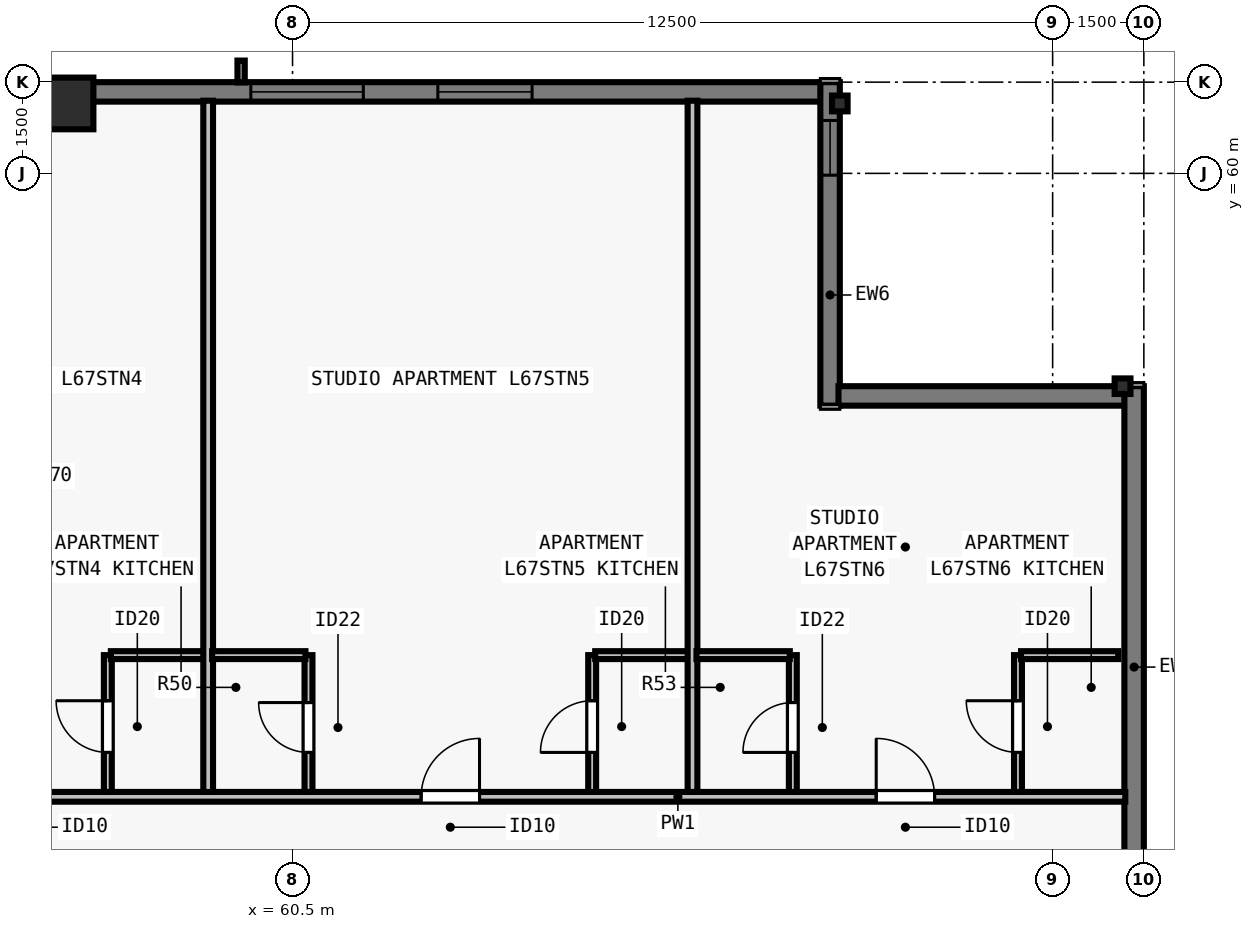
"""IFC4 building model, lengths in metres.
Left out: names, types, materials, properties, quantities, classifications, styles, units other than length and angle.
Written with IfcOpenShell. Run it as: python <this file> out.ifc"""

import sys

from ifc_helpers import new_model, si_unit, direction, frame, frame_2d, origin, origin_2d, place, context, subcontext, project, spatial, rectangle, i_section, extrude, element, fill, save


model = new_model("IFC4")
c1 = context("Model", 3, precision=1e-05, world=origin(), true_north=direction((0.0, 1.0)))
c2 = subcontext(c1, "Body", "Model", "MODEL_VIEW")
j1 = project(units=[si_unit("LENGTHUNIT", "METRE"), si_unit("PLANEANGLEUNIT", "RADIAN")], contexts=[c1])
p1 = place(None, origin())
s1 = spatial("IfcSite", under=j1, at=p1, CompositionType="ELEMENT")
p2 = place(p1, origin())
s2 = spatial("IfcBuilding", under=s1, at=p2, CompositionType="ELEMENT")
p3 = place(p2, frame((0.0, 0.0, 244.5)))
s3 = spatial("IfcBuildingStorey", under=s2, at=p3, CompositionType="ELEMENT", Elevation=244.5)
for number, where, z_axis, x_axis in (
    (1, (74.15, 56.5, 0.0), (0.0, 0.0, 1.0), (0.0, 1.0, 0.0)),
    (2, (69.5, 61.15, 0.0), (0.0, 0.0, 1.0), (1.0, 0.0, 0.0)),
):
    element("IfcColumn", number, at=place(p3, frame(where, z_axis=z_axis, x_axis=x_axis)), inside=s3, PredefinedType="COLUMN", context=c2, shape_type="SweptSolid", body=[
        extrude(i_section(OverallWidth=0.256, OverallDepth=0.26, WebThickness=0.01, FlangeThickness=0.017, FilletRadius=0.013, at=origin_2d()), origin(), (0.0, 0.0, 1.0), 3.5),
    ])
p4 = place(p3, frame((56.8, 61.15, 0.0), z_axis=(0.0, 0.0, 1.0), x_axis=(1.0, 0.0, 0.0)))
e3 = element("IfcColumn", 3, at=p4, inside=s3, PredefinedType="COLUMN", context=c2, shape_type="SweptSolid", body=[
    extrude(rectangle(XDim=0.85, YDim=0.85, at=origin_2d()), origin(), (0.0, 0.0, 1.0), 3.5),
])
p5 = place(p3, frame((34.5, 61.34, 0.0), z_axis=(0.0, 0.0, 1.0), x_axis=(1.0, 0.0, 0.0)))
e4 = element("IfcWall", 4, at=p5, inside=s3, PredefinedType="SOLIDWALL", context=c2, shape_type="SweptSolid", body=[
    extrude(rectangle(XDim=34.702, YDim=0.32, at=frame_2d((17.351, 0.0))), origin(), (0.0, 0.0, 1.0), 3.29),
])
p6 = place(p5, frame((4.613, 0.0, 0.8)))
e5 = element("IfcOpeningElement", 5, at=p6, cuts=e4, PredefinedType="OPENING", context=c2, shape_type="SweptSolid", body=[
    extrude(rectangle(XDim=1.85, YDim=1.678, at=frame_2d((0.925, 0.839))), frame((0.0, 0.17, 0.0), z_axis=(0.0, -1.0, 0.0), x_axis=(1.0, 0.0, 0.0)), (0.0, 0.0, 1.0), 0.34),
])
p7 = place(p5, frame((7.688, 0.0, 0.8)))
e6 = element("IfcOpeningElement", 6, at=p7, cuts=e4, PredefinedType="OPENING", context=c2, shape_type="SweptSolid", body=[
    extrude(rectangle(XDim=1.55, YDim=1.678, at=frame_2d((0.775, 0.839))), frame((0.0, 0.17, 0.0), z_axis=(0.0, -1.0, 0.0), x_axis=(1.0, 0.0, 0.0)), (0.0, 0.0, 1.0), 0.34),
])
p8 = place(p5, frame((14.888, 0.0, 0.8)))
e7 = element("IfcOpeningElement", 7, at=p8, cuts=e4, PredefinedType="OPENING", context=c2, shape_type="SweptSolid", body=[
    extrude(rectangle(XDim=1.55, YDim=1.678, at=frame_2d((0.775, 0.839))), frame((0.0, 0.17, 0.0), z_axis=(0.0, -1.0, 0.0), x_axis=(1.0, 0.0, 0.0)), (0.0, 0.0, 1.0), 0.34),
])
p9 = place(p5, frame((18.564, 0.0, 0.8)))
e8 = element("IfcOpeningElement", 8, at=p9, cuts=e4, PredefinedType="OPENING", context=c2, shape_type="SweptSolid", body=[
    extrude(rectangle(XDim=1.85, YDim=1.678, at=frame_2d((0.925, 0.839))), frame((0.0, 0.17, 0.0), z_axis=(0.0, -1.0, 0.0), x_axis=(1.0, 0.0, 0.0)), (0.0, 0.0, 1.0), 0.34),
])
p10 = place(p5, frame((25.314, 0.0, 0.8)))
e9 = element("IfcOpeningElement", 9, at=p10, cuts=e4, PredefinedType="OPENING", context=c2, shape_type="SweptSolid", body=[
    extrude(rectangle(XDim=1.85, YDim=1.678, at=frame_2d((0.925, 0.839))), frame((0.0, 0.17, 0.0), z_axis=(0.0, -1.0, 0.0), x_axis=(1.0, 0.0, 0.0)), (0.0, 0.0, 1.0), 0.34),
])
p11 = place(p5, frame((28.389, 0.0, 0.8)))
e10 = element("IfcOpeningElement", 10, at=p11, cuts=e4, PredefinedType="OPENING", context=c2, shape_type="SweptSolid", body=[
    extrude(rectangle(XDim=1.55, YDim=1.678, at=frame_2d((0.775, 0.839))), frame((0.0, 0.17, 0.0), z_axis=(0.0, -1.0, 0.0), x_axis=(1.0, 0.0, 0.0)), (0.0, 0.0, 1.0), 0.34),
])
p12 = place(p3, frame((69.34, 61.5, 0.0), z_axis=(0.0, 0.0, 1.0), x_axis=(0.0, -1.0, 0.0)))
e11 = element("IfcWall", 11, at=p12, inside=s3, PredefinedType="SOLIDWALL", context=c2, shape_type="SweptSolid", body=[
    extrude(rectangle(XDim=5.32, YDim=0.32, at=frame_2d((2.66, 0.0))), origin(), (0.0, 0.0, 1.0), 3.29),
])
p13 = place(p12, frame((0.63, 0.0, 0.8)))
e12 = element("IfcOpeningElement", 12, at=p13, cuts=e11, PredefinedType="OPENING", context=c2, shape_type="SweptSolid", body=[
    extrude(rectangle(XDim=0.9, YDim=1.678, at=frame_2d((0.45, 0.839))), frame((0.0, 0.17, 0.0), z_axis=(0.0, -1.0, 0.0), x_axis=(1.0, 0.0, 0.0)), (0.0, 0.0, 1.0), 0.34),
])
p14 = place(p3, frame((69.478, 56.34, 0.0), z_axis=(0.0, 0.0, 1.0), x_axis=(1.0, 0.0, 0.0)))
e13 = element("IfcWall", 13, at=p14, inside=s3, PredefinedType="SOLIDWALL", context=c2, shape_type="SweptSolid", body=[
    extrude(rectangle(XDim=4.724, YDim=0.32, at=frame_2d((2.362, 0.0))), origin(), (0.0, 0.0, 1.0), 3.29),
])
p15 = place(p3, frame((74.34, 56.5, 0.0), z_axis=(0.0, 0.0, 1.0), x_axis=(0.0, -1.0, 0.0)))
e14 = element("IfcWall", 14, at=p15, inside=s3, PredefinedType="SOLIDWALL", context=c2, shape_type="SweptSolid", body=[
    extrude(rectangle(XDim=34.702, YDim=0.32, at=frame_2d((17.351, 0.0))), origin(), (0.0, 0.0, 1.0), 3.29),
])
p16 = place(p15, frame((9.388, 0.0, 0.8)))
e15 = element("IfcOpeningElement", 15, at=p16, cuts=e14, PredefinedType="OPENING", context=c2, shape_type="SweptSolid", body=[
    extrude(rectangle(XDim=1.55, YDim=1.678, at=frame_2d((0.775, 0.839))), frame((0.0, 0.17, 0.0), z_axis=(0.0, -1.0, 0.0), x_axis=(1.0, 0.0, 0.0)), (0.0, 0.0, 1.0), 0.34),
])
p17 = place(p15, frame((14.038, 0.0, 0.8)))
e16 = element("IfcOpeningElement", 16, at=p17, cuts=e14, PredefinedType="OPENING", context=c2, shape_type="SweptSolid", body=[
    extrude(rectangle(XDim=1.55, YDim=1.678, at=frame_2d((0.775, 0.839))), frame((0.0, 0.17, 0.0), z_axis=(0.0, -1.0, 0.0), x_axis=(1.0, 0.0, 0.0)), (0.0, 0.0, 1.0), 0.34),
])
p18 = place(p15, frame((18.114, 0.0, 0.8)))
e17 = element("IfcOpeningElement", 17, at=p18, cuts=e14, PredefinedType="OPENING", context=c2, shape_type="SweptSolid", body=[
    extrude(rectangle(XDim=1.85, YDim=1.678, at=frame_2d((0.925, 0.839))), frame((0.0, 0.17, 0.0), z_axis=(0.0, -1.0, 0.0), x_axis=(1.0, 0.0, 0.0)), (0.0, 0.0, 1.0), 0.34),
])
p19 = place(p15, frame((23.614, 0.0, 0.8)))
e18 = element("IfcOpeningElement", 18, at=p19, cuts=e14, PredefinedType="OPENING", context=c2, shape_type="SweptSolid", body=[
    extrude(rectangle(XDim=1.85, YDim=1.678, at=frame_2d((0.925, 0.839))), frame((0.0, 0.17, 0.0), z_axis=(0.0, -1.0, 0.0), x_axis=(1.0, 0.0, 0.0)), (0.0, 0.0, 1.0), 0.34),
])
p20 = place(p15, frame((30.95, 0.0, 0.8)))
e19 = element("IfcOpeningElement", 19, at=p20, cuts=e14, PredefinedType="OPENING", context=c2, shape_type="SweptSolid", body=[
    extrude(rectangle(XDim=0.9, YDim=1.678, at=frame_2d((0.45, 0.839))), frame((0.0, 0.17, 0.0), z_axis=(0.0, -1.0, 0.0), x_axis=(1.0, 0.0, 0.0)), (0.0, 0.0, 1.0), 0.34),
])
p21 = place(p3, frame((29.805, 49.748, 0.0), z_axis=(0.0, 0.0, 1.0), x_axis=(1.0, 0.0, 0.0)))
e20 = element("IfcWall", 20, at=p21, inside=s3, PredefinedType="PARTITIONING", context=c2, shape_type="SweptSolid", body=[
    extrude(rectangle(XDim=44.39, YDim=0.16, at=frame_2d((22.195, 0.0))), origin(), (0.0, 0.0, 1.0), 2.958),
])
p22 = place(p21, frame((3.494, 0.0, 0.0)))
e21 = element("IfcOpeningElement", 21, at=p22, cuts=e20, PredefinedType="OPENING", context=c2, shape_type="SweptSolid", body=[
    extrude(rectangle(XDim=0.96, YDim=2.18, at=frame_2d((0.48, 1.09))), frame((0.0, 0.09, 0.0), z_axis=(0.0, -1.0, 0.0), x_axis=(1.0, 0.0, 0.0)), (0.0, 0.0, 1.0), 0.18),
])
p23 = place(p21, frame((10.73, 0.0, 0.0)))
e22 = element("IfcOpeningElement", 22, at=p23, cuts=e20, PredefinedType="OPENING", context=c2, shape_type="SweptSolid", body=[
    extrude(rectangle(XDim=0.96, YDim=2.18, at=frame_2d((0.48, 1.09))), frame((0.0, 0.09, 0.0), z_axis=(0.0, -1.0, 0.0), x_axis=(1.0, 0.0, 0.0)), (0.0, 0.0, 1.0), 0.18),
])
p24 = place(p21, frame((18.09, 0.0, 0.0)))
e23 = element("IfcOpeningElement", 23, at=p24, cuts=e20, PredefinedType="OPENING", context=c2, shape_type="SweptSolid", body=[
    extrude(rectangle(XDim=0.96, YDim=2.18, at=frame_2d((0.48, 1.09))), frame((0.0, 0.09, 0.0), z_axis=(0.0, -1.0, 0.0), x_axis=(1.0, 0.0, 0.0)), (0.0, 0.0, 1.0), 0.18),
])
p25 = place(p21, frame((25.45, 0.0, 0.0)))
e24 = element("IfcOpeningElement", 24, at=p25, cuts=e20, PredefinedType="OPENING", context=c2, shape_type="SweptSolid", body=[
    extrude(rectangle(XDim=0.96, YDim=2.18, at=frame_2d((0.48, 1.09))), frame((0.0, 0.09, 0.0), z_axis=(0.0, -1.0, 0.0), x_axis=(1.0, 0.0, 0.0)), (0.0, 0.0, 1.0), 0.18),
])
p26 = place(p21, frame((32.81, 0.0, 0.0)))
e25 = element("IfcOpeningElement", 25, at=p26, cuts=e20, PredefinedType="OPENING", context=c2, shape_type="SweptSolid", body=[
    extrude(rectangle(XDim=0.96, YDim=2.18, at=frame_2d((0.48, 1.09))), frame((0.0, 0.09, 0.0), z_axis=(0.0, -1.0, 0.0), x_axis=(1.0, 0.0, 0.0)), (0.0, 0.0, 1.0), 0.18),
])
p27 = place(p21, frame((40.294, 0.0, 0.0)))
e26 = element("IfcOpeningElement", 26, at=p27, cuts=e20, PredefinedType="OPENING", context=c2, shape_type="SweptSolid", body=[
    extrude(rectangle(XDim=0.96, YDim=2.18, at=frame_2d((0.48, 1.09))), frame((0.0, 0.09, 0.0), z_axis=(0.0, -1.0, 0.0), x_axis=(1.0, 0.0, 0.0)), (0.0, 0.0, 1.0), 0.18),
])
p28 = place(p3, frame((57.462, 49.827, 0.0), z_axis=(0.0, 0.0, 1.0), x_axis=(0.0, 1.0, 0.0)))
e27 = element("IfcWall", 27, at=p28, inside=s3, PredefinedType="PLUMBINGWALL", context=c2, shape_type="SweptSolid", body=[
    extrude(rectangle(XDim=2.25, YDim=0.13, at=frame_2d((1.125, 0.0))), origin(), (0.0, 0.0, 1.0), 3.29),
])
p29 = place(p28, frame((0.65, 0.0, 0.0)))
e28 = element("IfcOpeningElement", 28, at=p29, cuts=e27, PredefinedType="OPENING", context=c2, shape_type="SweptSolid", body=[
    extrude(rectangle(XDim=0.85, YDim=2.1, at=frame_2d((0.425, 1.05))), frame((0.0, 0.075, 0.0), z_axis=(0.0, -1.0, 0.0), x_axis=(1.0, 0.0, 0.0)), (0.0, 0.0, 1.0), 0.15),
])
p30 = place(p3, frame((57.512, 52.077, 0.0), z_axis=(0.0, 0.0, 1.0), x_axis=(1.0, 0.0, 0.0)))
e29 = element("IfcWall", 29, at=p30, inside=s3, PredefinedType="PLUMBINGWALL", context=c2, shape_type="SweptSolid", body=[
    extrude(rectangle(XDim=1.6, YDim=0.13, at=frame_2d((0.8, 0.0))), origin(), (0.0, 0.0, 1.0), 3.29),
])
p31 = place(p3, frame((59.113, 49.827, 0.0), z_axis=(0.0, 0.0, 1.0), x_axis=(0.0, 1.0, 0.0)))
e30 = element("IfcWall", 30, at=p31, inside=s3, PredefinedType="PARTITIONING", context=c2, shape_type="SweptSolid", body=[
    extrude(rectangle(XDim=11.368, YDim=0.16, at=frame_2d((5.684, 0.0))), origin(), (0.0, 0.0, 1.0), 3.29),
])
p32 = place(p3, frame((60.762, 49.827, 0.0), z_axis=(0.0, 0.0, 1.0), x_axis=(0.0, 1.0, 0.0)))
e31 = element("IfcWall", 31, at=p32, inside=s3, PredefinedType="PLUMBINGWALL", context=c2, shape_type="SweptSolid", body=[
    extrude(rectangle(XDim=2.25, YDim=0.13, at=frame_2d((1.125, 0.0))), origin(), (0.0, 0.0, 1.0), 3.29),
])
p33 = place(p32, frame((0.65, 0.0, 0.0)))
e32 = element("IfcOpeningElement", 32, at=p33, cuts=e31, PredefinedType="OPENING", context=c2, shape_type="SweptSolid", body=[
    extrude(rectangle(XDim=0.82, YDim=2.1, at=frame_2d((0.41, 1.05))), frame((0.0, 0.075, 0.0), z_axis=(0.0, -1.0, 0.0), x_axis=(1.0, 0.0, 0.0)), (0.0, 0.0, 1.0), 0.15),
])
p34 = place(p3, frame((59.177, 52.077, 0.0), z_axis=(0.0, 0.0, 1.0), x_axis=(1.0, 0.0, 0.0)))
e33 = element("IfcWall", 33, at=p34, inside=s3, PredefinedType="PLUMBINGWALL", context=c2, shape_type="SweptSolid", body=[
    extrude(rectangle(XDim=1.535, YDim=0.13, at=frame_2d((0.768, 0.0))), origin(), (0.0, 0.0, 1.0), 3.29),
])
p35 = place(p3, frame((65.427, 49.827, 0.0), z_axis=(0.0, 0.0, 1.0), x_axis=(0.0, 1.0, 0.0)))
e34 = element("IfcWall", 34, at=p35, inside=s3, PredefinedType="PLUMBINGWALL", context=c2, shape_type="SweptSolid", body=[
    extrude(rectangle(XDim=2.25, YDim=0.13, at=frame_2d((1.125, 0.0))), origin(), (0.0, 0.0, 1.0), 3.29),
])
p36 = place(p35, frame((0.65, 0.0, 0.0)))
e35 = element("IfcOpeningElement", 35, at=p36, cuts=e34, PredefinedType="OPENING", context=c2, shape_type="SweptSolid", body=[
    extrude(rectangle(XDim=0.85, YDim=2.1, at=frame_2d((0.425, 1.05))), frame((0.0, 0.075, 0.0), z_axis=(0.0, -1.0, 0.0), x_axis=(1.0, 0.0, 0.0)), (0.0, 0.0, 1.0), 0.15),
])
p37 = place(p3, frame((65.478, 52.077, 0.0), z_axis=(0.0, 0.0, 1.0), x_axis=(1.0, 0.0, 0.0)))
e36 = element("IfcWall", 36, at=p37, inside=s3, PredefinedType="PLUMBINGWALL", context=c2, shape_type="SweptSolid", body=[
    extrude(rectangle(XDim=1.6, YDim=0.13, at=frame_2d((0.8, 0.0))), origin(), (0.0, 0.0, 1.0), 3.29),
])
p38 = place(p3, frame((67.077, 49.827, 0.0), z_axis=(0.0, 0.0, 1.0), x_axis=(0.0, 1.0, 0.0)))
e37 = element("IfcWall", 37, at=p38, inside=s3, PredefinedType="PARTITIONING", context=c2, shape_type="SweptSolid", body=[
    extrude(rectangle(XDim=11.368, YDim=0.16, at=frame_2d((5.684, 0.0))), origin(), (0.0, 0.0, 1.0), 2.573),
])
p39 = place(p3, frame((68.728, 49.827, 0.0), z_axis=(0.0, 0.0, 1.0), x_axis=(0.0, 1.0, 0.0)))
e38 = element("IfcWall", 38, at=p39, inside=s3, PredefinedType="PLUMBINGWALL", context=c2, shape_type="SweptSolid", body=[
    extrude(rectangle(XDim=2.25, YDim=0.13, at=frame_2d((1.125, 0.0))), origin(), (0.0, 0.0, 1.0), 3.29),
])
p40 = place(p39, frame((0.65, 0.0, 0.0)))
e39 = element("IfcOpeningElement", 39, at=p40, cuts=e38, PredefinedType="OPENING", context=c2, shape_type="SweptSolid", body=[
    extrude(rectangle(XDim=0.82, YDim=2.1, at=frame_2d((0.41, 1.05))), frame((0.0, 0.075, 0.0), z_axis=(0.0, -1.0, 0.0), x_axis=(1.0, 0.0, 0.0)), (0.0, 0.0, 1.0), 0.15),
])
p41 = place(p3, frame((67.143, 52.077, 0.0), z_axis=(0.0, 0.0, 1.0), x_axis=(1.0, 0.0, 0.0)))
e40 = element("IfcWall", 40, at=p41, inside=s3, PredefinedType="PLUMBINGWALL", context=c2, shape_type="SweptSolid", body=[
    extrude(rectangle(XDim=1.535, YDim=0.13, at=frame_2d((0.768, 0.0))), origin(), (0.0, 0.0, 1.0), 2.958),
])
p42 = place(p3, frame((72.43, 49.827, 0.0), z_axis=(0.0, 0.0, 1.0), x_axis=(0.0, 1.0, 0.0)))
e41 = element("IfcWall", 41, at=p42, inside=s3, PredefinedType="PLUMBINGWALL", context=c2, shape_type="SweptSolid", body=[
    extrude(rectangle(XDim=2.25, YDim=0.13, at=frame_2d((1.125, 0.0))), origin(), (0.0, 0.0, 1.0), 3.29),
])
p43 = place(p42, frame((0.65, 0.0, 0.0)))
e42 = element("IfcOpeningElement", 42, at=p43, cuts=e41, PredefinedType="OPENING", context=c2, shape_type="SweptSolid", body=[
    extrude(rectangle(XDim=0.85, YDim=2.1, at=frame_2d((0.425, 1.05))), frame((0.0, 0.075, 0.0), z_axis=(0.0, -1.0, 0.0), x_axis=(1.0, 0.0, 0.0)), (0.0, 0.0, 1.0), 0.15),
])
p44 = place(p3, frame((72.48, 52.077, 0.0), z_axis=(0.0, 0.0, 1.0), x_axis=(1.0, 0.0, 0.0)))
e43 = element("IfcWall", 43, at=p44, inside=s3, PredefinedType="PLUMBINGWALL", context=c2, shape_type="SweptSolid", body=[
    extrude(rectangle(XDim=1.6, YDim=0.13, at=frame_2d((0.8, 0.0))), origin(), (0.0, 0.0, 1.0), 3.29),
])
p45 = place(p10, origin())
e44 = element("IfcWindow", 44, at=p45, inside=s3, PartitioningType="SINGLE_PANEL", PredefinedType="WINDOW", context=c2, shape_type="SweptSolid", body=[
    extrude(rectangle(XDim=1.85, YDim=1.678, at=frame_2d((0.925, 0.839))), frame((0.0, -0.05, 0.0), z_axis=(0.0, -1.0, 0.0), x_axis=(1.0, 0.0, 0.0)), (0.0, 0.0, 1.0), 0.06),
])
fill(e9, e44)
p46 = place(p11, origin())
e45 = element("IfcWindow", 45, at=p46, inside=s3, PartitioningType="SINGLE_PANEL", PredefinedType="WINDOW", context=c2, shape_type="SweptSolid", body=[
    extrude(rectangle(XDim=1.55, YDim=1.678, at=frame_2d((0.775, 0.839))), frame((0.0, -0.05, 0.0), z_axis=(0.0, -1.0, 0.0), x_axis=(1.0, 0.0, 0.0)), (0.0, 0.0, 1.0), 0.06),
])
fill(e10, e45)
p47 = place(p13, origin())
e46 = element("IfcWindow", 46, at=p47, inside=s3, PartitioningType="SINGLE_PANEL", PredefinedType="WINDOW", context=c2, shape_type="SweptSolid", body=[
    extrude(rectangle(XDim=0.9, YDim=1.678, at=frame_2d((0.45, 0.839))), frame((0.0, -0.04, 0.0), z_axis=(0.0, -1.0, 0.0), x_axis=(1.0, 0.0, 0.0)), (0.0, 0.0, 1.0), 0.06),
])
fill(e12, e46)
p48 = place(p29, origin())
e47 = element("IfcDoor", 47, at=p48, inside=s3, OperationType="SINGLE_SWING_RIGHT", PredefinedType="DOOR", context=c2, shape_type="SweptSolid", body=[
    extrude(rectangle(XDim=0.85, YDim=2.1, at=frame_2d((0.425, 1.05))), frame((0.0, 0.025, 0.0), z_axis=(0.0, -1.0, 0.0), x_axis=(1.0, 0.0, 0.0)), (0.0, 0.0, 1.0), 0.05),
])
fill(e28, e47)
p49 = place(p33, origin())
e48 = element("IfcDoor", 48, at=p49, inside=s3, OperationType="SINGLE_SWING_RIGHT", PredefinedType="DOOR", context=c2, shape_type="SweptSolid", body=[
    extrude(rectangle(XDim=0.82, YDim=2.1, at=frame_2d((0.41, 1.05))), frame((0.0, 0.025, 0.0), z_axis=(0.0, -1.0, 0.0), x_axis=(1.0, 0.0, 0.0)), (0.0, 0.0, 1.0), 0.05),
])
fill(e32, e48)
p50 = place(p36, origin())
e49 = element("IfcDoor", 49, at=p50, inside=s3, OperationType="SINGLE_SWING_LEFT", PredefinedType="DOOR", context=c2, shape_type="SweptSolid", body=[
    extrude(rectangle(XDim=0.85, YDim=2.1, at=frame_2d((0.425, 1.05))), frame((0.0, 0.025, 0.0), z_axis=(0.0, -1.0, 0.0), x_axis=(1.0, 0.0, 0.0)), (0.0, 0.0, 1.0), 0.05),
])
fill(e35, e49)
p51 = place(p26, origin())
e50 = element("IfcDoor", 50, at=p51, inside=s3, OperationType="SINGLE_SWING_RIGHT", PredefinedType="DOOR", context=c2, shape_type="SweptSolid", body=[
    extrude(rectangle(XDim=0.96, YDim=2.18, at=frame_2d((0.48, 1.09))), frame((0.0, 0.025, 0.0), z_axis=(0.0, -1.0, 0.0), x_axis=(1.0, 0.0, 0.0)), (0.0, 0.0, 1.0), 0.05),
])
fill(e25, e50)
p52 = place(p40, origin())
e51 = element("IfcDoor", 51, at=p52, inside=s3, OperationType="SINGLE_SWING_LEFT", PredefinedType="DOOR", context=c2, shape_type="SweptSolid", body=[
    extrude(rectangle(XDim=0.82, YDim=2.1, at=frame_2d((0.41, 1.05))), frame((0.0, 0.025, 0.0), z_axis=(0.0, -1.0, 0.0), x_axis=(1.0, 0.0, 0.0)), (0.0, 0.0, 1.0), 0.05),
])
fill(e39, e51)
p53 = place(p43, origin())
e52 = element("IfcDoor", 52, at=p53, inside=s3, OperationType="SINGLE_SWING_RIGHT", PredefinedType="DOOR", context=c2, shape_type="SweptSolid", body=[
    extrude(rectangle(XDim=0.85, YDim=2.1, at=frame_2d((0.425, 1.05))), frame((0.0, 0.025, 0.0), z_axis=(0.0, -1.0, 0.0), x_axis=(1.0, 0.0, 0.0)), (0.0, 0.0, 1.0), 0.05),
])
fill(e42, e52)
p54 = place(p27, origin())
e53 = element("IfcDoor", 53, at=p54, inside=s3, OperationType="SINGLE_SWING_LEFT", PredefinedType="DOOR", context=c2, shape_type="SweptSolid", body=[
    extrude(rectangle(XDim=0.96, YDim=2.18, at=frame_2d((0.48, 1.09))), frame((0.0, 0.025, 0.0), z_axis=(0.0, -1.0, 0.0), x_axis=(1.0, 0.0, 0.0)), (0.0, 0.0, 1.0), 0.05),
])
fill(e26, e53)
save(model, sys.argv[1])
